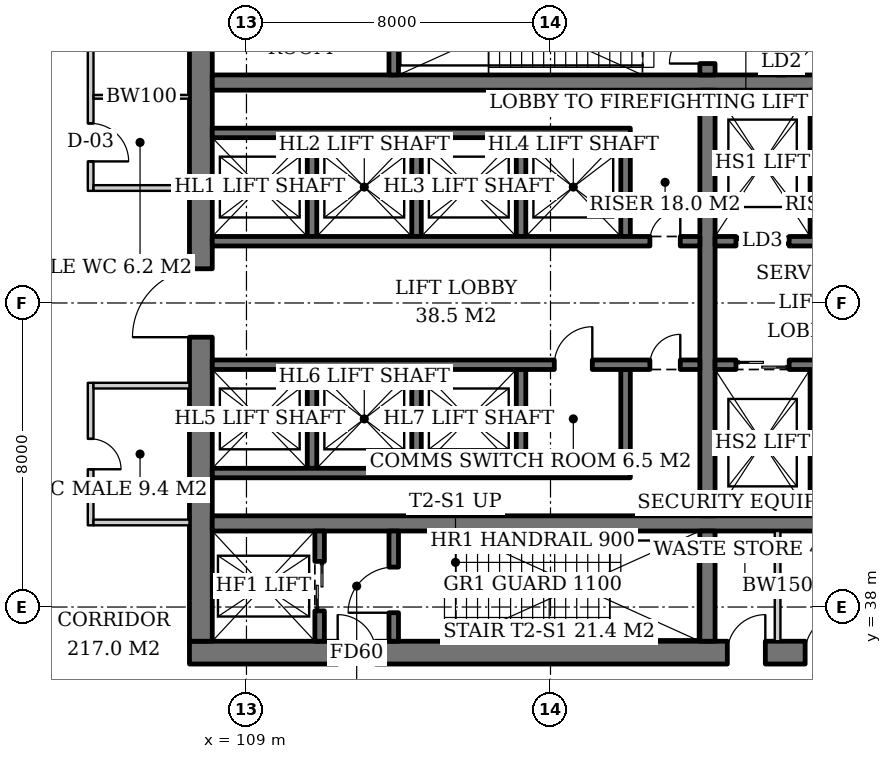
"""IFC4 building model, lengths in metres.
Left out: names, types, materials, properties, quantities, classifications, styles, units other than length and angle.
Written with IfcOpenShell. Run it as: python <this file> out.ifc"""

import sys

from ifc_helpers import new_model, si_unit, direction, frame, frame_2d, origin, place, context, subcontext, project, spatial, rectangle, extrude, element, fill, save


model = new_model("IFC4")
c1 = context("Model", 3, precision=1e-05, world=origin(), true_north=direction((0.0, 1.0)))
c2 = subcontext(c1, "Body", "Model", "MODEL_VIEW")
j1 = project(units=[si_unit("LENGTHUNIT", "METRE"), si_unit("PLANEANGLEUNIT", "RADIAN")], contexts=[c1])
p1 = place(None, origin())
s1 = spatial("IfcSite", under=j1, at=p1, CompositionType="ELEMENT")
p2 = place(p1, origin())
s2 = spatial("IfcBuilding", under=s1, at=p2, CompositionType="ELEMENT")
p3 = place(p2, frame((0.0, 0.0, 6.0)))
s3 = spatial("IfcBuildingStorey", under=s2, at=p3, CompositionType="ELEMENT", Elevation=6.0)
p4 = place(p3, frame((107.5, 36.8, 0.0), z_axis=(0.0, 0.0, 1.0), x_axis=(1.0, 0.0, 0.0)))
e1 = element("IfcWall", 1, at=p4, inside=s3, PredefinedType="SHEAR", context=c2, shape_type="SweptSolid", body=[
    extrude(rectangle(XDim=19.0, YDim=0.6, at=frame_2d((9.5, 0.0))), origin(), (0.0, 0.0, 1.0), 5.0),
])
p5 = place(p4, frame((3.9, 0.0, 0.0)))
e2 = element("IfcOpeningElement", 2, at=p5, cuts=e1, PredefinedType="OPENING", context=c2, shape_type="SweptSolid", body=[
    extrude(rectangle(XDim=1.0, YDim=2.1, at=frame_2d((0.5, 1.05))), frame((0.0, 0.31, 0.0), z_axis=(0.0, -1.0, 0.0), x_axis=(1.0, 0.0, 0.0)), (0.0, 0.0, 1.0), 0.62),
])
p6 = place(p4, frame((14.153, 0.0, 0.0)))
e3 = element("IfcOpeningElement", 3, at=p6, cuts=e1, PredefinedType="OPENING", context=c2, shape_type="SweptSolid", body=[
    extrude(rectangle(XDim=1.0, YDim=2.1, at=frame_2d((0.5, 1.05))), frame((0.0, 0.31, 0.0), z_axis=(0.0, -1.0, 0.0), x_axis=(1.0, 0.0, 0.0)), (0.0, 0.0, 1.0), 0.62),
])
p7 = place(p4, frame((16.2, 0.0, 0.0)))
e4 = element("IfcOpeningElement", 4, at=p7, cuts=e1, PredefinedType="OPENING", context=c2, shape_type="SweptSolid", body=[
    extrude(rectangle(XDim=1.0, YDim=2.1, at=frame_2d((0.5, 1.05))), frame((0.0, 0.31, 0.0), z_axis=(0.0, -1.0, 0.0), x_axis=(1.0, 0.0, 0.0)), (0.0, 0.0, 1.0), 0.62),
])
p8 = place(p3, frame((107.8, 37.1, 0.0), z_axis=(0.0, 0.0, 1.0), x_axis=(0.0, 1.0, 0.0)))
e5 = element("IfcWall", 5, at=p8, inside=s3, PredefinedType="SHEAR", context=c2, shape_type="SweptSolid", body=[
    extrude(rectangle(XDim=17.8, YDim=0.6, at=frame_2d((8.9, 0.0))), origin(), (0.0, 0.0, 1.0), 5.0),
])
p9 = place(p8, frame((8.0, 0.0, 0.0)))
e6 = element("IfcOpeningElement", 6, at=p9, cuts=e5, PredefinedType="OPENING", context=c2, shape_type="SweptSolid", body=[
    extrude(rectangle(XDim=1.8, YDim=2.4, at=frame_2d((0.9, 1.2))), frame((0.0, 0.31, 0.0), z_axis=(0.0, -1.0, 0.0), x_axis=(1.0, 0.0, 0.0)), (0.0, 0.0, 1.0), 0.62),
])
for number, where, z_axis, x_axis in (
    (7, (108.1, 40.2, 0.0), (0.0, 0.0, 1.0), (1.0, 0.0, 0.0)),
    (8, (108.1, 51.8, 0.0), (0.0, 0.0, 1.0), (1.0, 0.0, 0.0)),
):
    element("IfcWall", number, at=place(p3, frame(where, z_axis=z_axis, x_axis=x_axis)), inside=s3, PredefinedType="SHEAR", context=c2, shape_type="SweptSolid", body=[
        extrude(rectangle(XDim=17.8, YDim=0.4, at=frame_2d((8.9, 0.0))), origin(), (0.0, 0.0, 1.0), 5.0),
    ])
p10 = place(p3, frame((121.13, 37.1, 0.0), z_axis=(0.0, 0.0, 1.0), x_axis=(0.0, 1.0, 0.0)))
e9 = element("IfcWall", 9, at=p10, inside=s3, PredefinedType="SHEAR", context=c2, shape_type="SweptSolid", body=[
    extrude(rectangle(XDim=2.9, YDim=0.4, at=frame_2d((1.45, 0.0))), origin(), (0.0, 0.0, 1.0), 5.0),
])
p11 = place(p3, frame((121.13, 40.4, 0.0), z_axis=(0.0, 0.0, 1.0), x_axis=(0.0, 1.0, 0.0)))
e10 = element("IfcWall", 10, at=p11, inside=s3, PredefinedType="SHEAR", context=c2, shape_type="SweptSolid", body=[
    extrude(rectangle(XDim=11.2, YDim=0.4, at=frame_2d((5.6, 0.0))), origin(), (0.0, 0.0, 1.0), 5.0),
])
p12 = place(p3, frame((121.13, 52.0, 0.0), z_axis=(0.0, 0.0, 1.0), x_axis=(0.0, 1.0, 0.0)))
e11 = element("IfcWall", 11, at=p12, inside=s3, PredefinedType="SHEAR", context=c2, shape_type="SweptSolid", body=[
    extrude(rectangle(XDim=2.9, YDim=0.4, at=frame_2d((1.45, 0.0))), origin(), (0.0, 0.0, 1.0), 5.0),
])
p13 = place(p12, frame((0.3, 0.0, 0.0)))
e12 = element("IfcOpeningElement", 12, at=p13, cuts=e11, PredefinedType="OPENING", context=c2, shape_type="SweptSolid", body=[
    extrude(rectangle(XDim=1.0, YDim=2.1, at=frame_2d((0.5, 1.05))), frame((0.0, 0.21, 0.0), z_axis=(0.0, -1.0, 0.0), x_axis=(1.0, 0.0, 0.0)), (0.0, 0.0, 1.0), 0.42),
])
p14 = place(p3, frame((110.925, 37.1, 0.0), z_axis=(0.0, 0.0, 1.0), x_axis=(0.0, 1.0, 0.0)))
e13 = element("IfcWall", 13, at=p14, inside=s3, PredefinedType="SHEAR", context=c2, shape_type="SweptSolid", body=[
    extrude(rectangle(XDim=2.9, YDim=0.25, at=frame_2d((1.45, 0.0))), origin(), (0.0, 0.0, 1.0), 5.0),
])
p15 = place(p14, frame((0.8, 0.0, 0.0)))
e14 = element("IfcOpeningElement", 14, at=p15, cuts=e13, PredefinedType="OPENING", context=c2, shape_type="SweptSolid", body=[
    extrude(rectangle(XDim=1.3, YDim=2.2, at=frame_2d((0.65, 1.1))), frame((0.0, 0.135, 0.0), z_axis=(0.0, -1.0, 0.0), x_axis=(1.0, 0.0, 0.0)), (0.0, 0.0, 1.0), 0.27),
])
p16 = place(p3, frame((112.875, 37.1, 0.0), z_axis=(0.0, 0.0, 1.0), x_axis=(0.0, 1.0, 0.0)))
e15 = element("IfcWall", 15, at=p16, inside=s3, PredefinedType="SHEAR", context=c2, shape_type="SweptSolid", body=[
    extrude(rectangle(XDim=2.9, YDim=0.25, at=frame_2d((1.45, 0.0))), origin(), (0.0, 0.0, 1.0), 5.0),
])
p17 = place(p16, frame((0.75, 0.0, 0.0)))
e16 = element("IfcOpeningElement", 16, at=p17, cuts=e15, PredefinedType="OPENING", context=c2, shape_type="SweptSolid", body=[
    extrude(rectangle(XDim=1.2, YDim=2.1, at=frame_2d((0.6, 1.05))), frame((0.0, 0.135, 0.0), z_axis=(0.0, -1.0, 0.0), x_axis=(1.0, 0.0, 0.0)), (0.0, 0.0, 1.0), 0.27),
])
p18 = place(p3, frame((112.875, 52.0, 0.0), z_axis=(0.0, 0.0, 1.0), x_axis=(0.0, 1.0, 0.0)))
e17 = element("IfcWall", 17, at=p18, inside=s3, PredefinedType="SHEAR", context=c2, shape_type="SweptSolid", body=[
    extrude(rectangle(XDim=2.9, YDim=0.25, at=frame_2d((1.45, 0.0))), origin(), (0.0, 0.0, 1.0), 5.0),
])
p19 = place(p3, frame((123.075, 52.0, 0.0), z_axis=(0.0, 0.0, 1.0), x_axis=(0.0, 1.0, 0.0)))
e18 = element("IfcWall", 18, at=p19, inside=s3, PredefinedType="SHEAR", context=c2, shape_type="SweptSolid", body=[
    extrude(rectangle(XDim=2.9, YDim=0.25, at=frame_2d((1.45, 0.0))), origin(), (0.0, 0.0, 1.0), 5.0),
])
p20 = place(p19, frame((0.8, 0.0, 0.0)))
e19 = element("IfcOpeningElement", 19, at=p20, cuts=e18, PredefinedType="OPENING", context=c2, shape_type="SweptSolid", body=[
    extrude(rectangle(XDim=1.3, YDim=2.2, at=frame_2d((0.65, 1.1))), frame((0.0, 0.135, 0.0), z_axis=(0.0, -1.0, 0.0), x_axis=(1.0, 0.0, 0.0)), (0.0, 0.0, 1.0), 0.27),
])
for number, where, z_axis, x_axis in (
    (20, (110.725, 47.75, 0.0), (0.0, 0.0, 1.0), (0.0, 1.0, 0.0)),
    (21, (113.475, 47.75, 0.0), (0.0, 0.0, 1.0), (0.0, 1.0, 0.0)),
    (22, (116.225, 47.75, 0.0), (0.0, 0.0, 1.0), (0.0, 1.0, 0.0)),
    (23, (118.975, 47.75, 0.0), (0.0, 0.0, 1.0), (0.0, 1.0, 0.0)),
):
    element("IfcWall", number, at=place(p3, frame(where, z_axis=z_axis, x_axis=x_axis)), inside=s3, PredefinedType="SHEAR", context=c2, shape_type="SweptSolid", body=[
        extrude(rectangle(XDim=2.6, YDim=0.25, at=frame_2d((1.3, 0.0))), origin(), (0.0, 0.0, 1.0), 5.0),
    ])
p21 = place(p3, frame((108.1, 50.475, 0.0), z_axis=(0.0, 0.0, 1.0), x_axis=(1.0, 0.0, 0.0)))
e24 = element("IfcWall", 24, at=p21, inside=s3, PredefinedType="SHEAR", context=c2, shape_type="SweptSolid", body=[
    extrude(rectangle(XDim=11.0, YDim=0.25, at=frame_2d((5.5, 0.0))), origin(), (0.0, 0.0, 1.0), 5.0),
])
p22 = place(p3, frame((108.1, 47.625, 0.0), z_axis=(0.0, 0.0, 1.0), x_axis=(1.0, 0.0, 0.0)))
e25 = element("IfcWall", 25, at=p22, inside=s3, PredefinedType="SHEAR", context=c2, shape_type="SweptSolid", body=[
    extrude(rectangle(XDim=12.83, YDim=0.25, at=frame_2d((6.415, 0.0))), origin(), (0.0, 0.0, 1.0), 5.0),
])
p23 = place(p22, frame((11.515, 0.0, 0.0)))
e26 = element("IfcOpeningElement", 26, at=p23, cuts=e25, PredefinedType="OPENING", context=c2, shape_type="SweptSolid", body=[
    extrude(rectangle(XDim=0.8, YDim=2.0, at=frame_2d((0.4, 1.0))), frame((0.0, 0.135, 0.0), z_axis=(0.0, -1.0, 0.0), x_axis=(1.0, 0.0, 0.0)), (0.0, 0.0, 1.0), 0.27),
])
for number, where, z_axis, x_axis in (
    (27, (110.725, 44.25, 0.0), (0.0, 0.0, 1.0), (0.0, -1.0, 0.0)),
    (28, (113.475, 44.25, 0.0), (0.0, 0.0, 1.0), (0.0, -1.0, 0.0)),
    (29, (116.225, 44.25, 0.0), (0.0, 0.0, 1.0), (0.0, -1.0, 0.0)),
    (30, (118.975, 44.25, 0.0), (0.0, 0.0, 1.0), (0.0, -1.0, 0.0)),
):
    element("IfcWall", number, at=place(p3, frame(where, z_axis=z_axis, x_axis=x_axis)), inside=s3, PredefinedType="SHEAR", context=c2, shape_type="SweptSolid", body=[
        extrude(rectangle(XDim=2.6, YDim=0.25, at=frame_2d((1.3, 0.0))), origin(), (0.0, 0.0, 1.0), 5.0),
    ])
p24 = place(p3, frame((108.1, 41.525, 0.0), z_axis=(0.0, 0.0, 1.0), x_axis=(1.0, 0.0, 0.0)))
e31 = element("IfcWall", 31, at=p24, inside=s3, PredefinedType="SHEAR", context=c2, shape_type="SweptSolid", body=[
    extrude(rectangle(XDim=11.0, YDim=0.25, at=frame_2d((5.5, 0.0))), origin(), (0.0, 0.0, 1.0), 5.0),
])
p25 = place(p3, frame((108.1, 44.375, 0.0), z_axis=(0.0, 0.0, 1.0), x_axis=(1.0, 0.0, 0.0)))
e32 = element("IfcWall", 32, at=p25, inside=s3, PredefinedType="SHEAR", context=c2, shape_type="SweptSolid", body=[
    extrude(rectangle(XDim=12.83, YDim=0.25, at=frame_2d((6.415, 0.0))), origin(), (0.0, 0.0, 1.0), 5.0),
])
p26 = place(p25, frame((9.0, 0.0, 0.0)))
e33 = element("IfcOpeningElement", 33, at=p26, cuts=e32, PredefinedType="OPENING", context=c2, shape_type="SweptSolid", body=[
    extrude(rectangle(XDim=1.0, YDim=2.1, at=frame_2d((0.5, 1.05))), frame((0.0, 0.135, 0.0), z_axis=(0.0, -1.0, 0.0), x_axis=(1.0, 0.0, 0.0)), (0.0, 0.0, 1.0), 0.27),
])
p27 = place(p25, frame((11.515, 0.0, 0.0)))
e34 = element("IfcOpeningElement", 34, at=p27, cuts=e32, PredefinedType="OPENING", context=c2, shape_type="SweptSolid", body=[
    extrude(rectangle(XDim=0.8, YDim=2.0, at=frame_2d((0.4, 1.0))), frame((0.0, 0.135, 0.0), z_axis=(0.0, -1.0, 0.0), x_axis=(1.0, 0.0, 0.0)), (0.0, 0.0, 1.0), 0.27),
])
p28 = place(p3, frame((123.955, 47.75, 0.0), z_axis=(0.0, 0.0, 1.0), x_axis=(0.0, 1.0, 0.0)))
e35 = element("IfcWall", 35, at=p28, inside=s3, PredefinedType="SHEAR", context=c2, shape_type="SweptSolid", body=[
    extrude(rectangle(XDim=3.85, YDim=0.25, at=frame_2d((1.925, 0.0))), origin(), (0.0, 0.0, 1.0), 5.0),
])
p29 = place(p3, frame((121.33, 47.625, 0.0), z_axis=(0.0, 0.0, 1.0), x_axis=(1.0, 0.0, 0.0)))
e36 = element("IfcWall", 36, at=p29, inside=s3, PredefinedType="SHEAR", context=c2, shape_type="SweptSolid", body=[
    extrude(rectangle(XDim=4.57, YDim=0.25, at=frame_2d((2.285, 0.0))), origin(), (0.0, 0.0, 1.0), 5.0),
])
p30 = place(p29, frame((0.55, 0.0, 0.0)))
e37 = element("IfcOpeningElement", 37, at=p30, cuts=e36, PredefinedType="OPENING", context=c2, shape_type="SweptSolid", body=[
    extrude(rectangle(XDim=1.4, YDim=2.4, at=frame_2d((0.7, 1.2))), frame((0.0, 0.135, 0.0), z_axis=(0.0, -1.0, 0.0), x_axis=(1.0, 0.0, 0.0)), (0.0, 0.0, 1.0), 0.27),
])
p31 = place(p29, frame((3.26, 0.0, 0.0)))
e38 = element("IfcOpeningElement", 38, at=p31, cuts=e36, PredefinedType="OPENING", context=c2, shape_type="SweptSolid", body=[
    extrude(rectangle(XDim=0.8, YDim=2.0, at=frame_2d((0.4, 1.0))), frame((0.0, 0.135, 0.0), z_axis=(0.0, -1.0, 0.0), x_axis=(1.0, 0.0, 0.0)), (0.0, 0.0, 1.0), 0.27),
])
p32 = place(p3, frame((123.955, 44.25, 0.0), z_axis=(0.0, 0.0, 1.0), x_axis=(0.0, -1.0, 0.0)))
e39 = element("IfcWall", 39, at=p32, inside=s3, PredefinedType="SHEAR", context=c2, shape_type="SweptSolid", body=[
    extrude(rectangle(XDim=3.85, YDim=0.25, at=frame_2d((1.925, 0.0))), origin(), (0.0, 0.0, 1.0), 5.0),
])
p33 = place(p3, frame((121.33, 44.375, 0.0), z_axis=(0.0, 0.0, 1.0), x_axis=(1.0, 0.0, 0.0)))
e40 = element("IfcWall", 40, at=p33, inside=s3, PredefinedType="SHEAR", context=c2, shape_type="SweptSolid", body=[
    extrude(rectangle(XDim=4.57, YDim=0.25, at=frame_2d((2.285, 0.0))), origin(), (0.0, 0.0, 1.0), 5.0),
])
p34 = place(p33, frame((0.55, 0.0, 0.0)))
e41 = element("IfcOpeningElement", 41, at=p34, cuts=e40, PredefinedType="OPENING", context=c2, shape_type="SweptSolid", body=[
    extrude(rectangle(XDim=1.4, YDim=2.4, at=frame_2d((0.7, 1.2))), frame((0.0, 0.135, 0.0), z_axis=(0.0, -1.0, 0.0), x_axis=(1.0, 0.0, 0.0)), (0.0, 0.0, 1.0), 0.27),
])
p35 = place(p33, frame((3.26, 0.0, 0.0)))
e42 = element("IfcOpeningElement", 42, at=p35, cuts=e40, PredefinedType="OPENING", context=c2, shape_type="SweptSolid", body=[
    extrude(rectangle(XDim=0.8, YDim=2.0, at=frame_2d((0.4, 1.0))), frame((0.0, 0.135, 0.0), z_axis=(0.0, -1.0, 0.0), x_axis=(1.0, 0.0, 0.0)), (0.0, 0.0, 1.0), 0.27),
])
p36 = place(p3, frame((122.975, 37.1, 0.0), z_axis=(0.0, 0.0, 1.0), x_axis=(0.0, 1.0, 0.0)))
e43 = element("IfcWall", 43, at=p36, inside=s3, PredefinedType="SOLIDWALL", context=c2, shape_type="SweptSolid", body=[
    extrude(rectangle(XDim=2.9, YDim=0.15, at=frame_2d((1.45, 0.0))), origin(), (0.0, 0.0, 1.0), 4.7),
])
p37 = place(p3, frame((104.9, 55.1, 0.0), z_axis=(0.0, 0.0, 1.0), x_axis=(0.0, -1.0, 0.0)))
e44 = element("IfcWall", 44, at=p37, inside=s3, PredefinedType="PARTITIONING", context=c2, shape_type="SweptSolid", body=[
    extrude(rectangle(XDim=6.15, YDim=0.15, at=frame_2d((3.075, 0.0))), origin(), (0.0, 0.0, 1.0), 3.9),
])
p38 = place(p37, frame((1.475, 0.0, 0.0)))
e45 = element("IfcOpeningElement", 45, at=p38, cuts=e44, PredefinedType="OPENING", context=c2, shape_type="SweptSolid", body=[
    extrude(rectangle(XDim=0.8, YDim=2.1, at=frame_2d((0.4, 1.05))), frame((0.0, 0.085, 0.0), z_axis=(0.0, -1.0, 0.0), x_axis=(1.0, 0.0, 0.0)), (0.0, 0.0, 1.0), 0.17),
])
p39 = place(p37, frame((4.375, 0.0, 0.0)))
e46 = element("IfcOpeningElement", 46, at=p39, cuts=e44, PredefinedType="OPENING", context=c2, shape_type="SweptSolid", body=[
    extrude(rectangle(XDim=1.0, YDim=2.1, at=frame_2d((0.5, 1.05))), frame((0.0, 0.085, 0.0), z_axis=(0.0, -1.0, 0.0), x_axis=(1.0, 0.0, 0.0)), (0.0, 0.0, 1.0), 0.17),
])
p40 = place(p3, frame((104.975, 51.425, 0.0), z_axis=(0.0, 0.0, 1.0), x_axis=(1.0, 0.0, 0.0)))
e47 = element("IfcWall", 47, at=p40, inside=s3, PredefinedType="SOLIDWALL", context=c2, shape_type="SweptSolid", body=[
    extrude(rectangle(XDim=2.525, YDim=0.1, at=frame_2d((1.262, 0.0))), origin(), (0.0, 0.0, 1.0), 4.7),
])
p41 = place(p3, frame((104.975, 49.025, 0.0), z_axis=(0.0, 0.0, 1.0), x_axis=(1.0, 0.0, 0.0)))
e48 = element("IfcWall", 48, at=p41, inside=s3, PredefinedType="PARTITIONING", context=c2, shape_type="SweptSolid", body=[
    extrude(rectangle(XDim=2.525, YDim=0.15, at=frame_2d((1.262, 0.0))), origin(), (0.0, 0.0, 1.0), 4.7),
])
p42 = place(p3, frame((104.9, 43.9, 0.0), z_axis=(0.0, 0.0, 1.0), x_axis=(0.0, -1.0, 0.0)))
e49 = element("IfcWall", 49, at=p42, inside=s3, PredefinedType="PARTITIONING", context=c2, shape_type="SweptSolid", body=[
    extrude(rectangle(XDim=3.75, YDim=0.15, at=frame_2d((1.875, 0.0))), origin(), (0.0, 0.0, 1.0), 3.947),
])
p43 = place(p42, frame((1.475, 0.0, 0.0)))
e50 = element("IfcOpeningElement", 50, at=p43, cuts=e49, PredefinedType="OPENING", context=c2, shape_type="SweptSolid", body=[
    extrude(rectangle(XDim=0.8, YDim=2.1, at=frame_2d((0.4, 1.05))), frame((0.0, 0.085, 0.0), z_axis=(0.0, -1.0, 0.0), x_axis=(1.0, 0.0, 0.0)), (0.0, 0.0, 1.0), 0.17),
])
for number, where, z_axis, x_axis in (
    (51, (104.975, 43.825, 0.0), (0.0, 0.0, 1.0), (1.0, 0.0, 0.0)),
    (52, (104.975, 40.225, 0.0), (0.0, 0.0, 1.0), (1.0, 0.0, 0.0)),
):
    element("IfcWall", number, at=place(p3, frame(where, z_axis=z_axis, x_axis=x_axis)), inside=s3, PredefinedType="PARTITIONING", context=c2, shape_type="SweptSolid", body=[
        extrude(rectangle(XDim=2.525, YDim=0.15, at=frame_2d((1.262, 0.0))), origin(), (0.0, 0.0, 1.0), 4.7),
    ])
p44 = place(p15, origin())
e53 = element("IfcDoor", 53, at=p44, inside=s3, OperationType="DOUBLE_DOOR_SLIDING", PredefinedType="DOOR", context=c2, shape_type="SweptSolid", body=[
    extrude(rectangle(XDim=1.3, YDim=2.2, at=frame_2d((0.65, 1.1))), frame((0.0, 0.025, 0.0), z_axis=(0.0, -1.0, 0.0), x_axis=(1.0, 0.0, 0.0)), (0.0, 0.0, 1.0), 0.05),
])
fill(e14, e53)
p45 = place(p17, origin())
e54 = element("IfcDoor", 54, at=p45, inside=s3, OperationType="SINGLE_SWING_LEFT", PredefinedType="DOOR", context=c2, shape_type="SweptSolid", body=[
    extrude(rectangle(XDim=1.2, YDim=2.1, at=frame_2d((0.6, 1.05))), frame((0.0, 0.025, 0.0), z_axis=(0.0, -1.0, 0.0), x_axis=(1.0, 0.0, 0.0)), (0.0, 0.0, 1.0), 0.05),
])
fill(e16, e54)
p46 = place(p23, origin())
e55 = element("IfcDoor", 55, at=p46, inside=s3, OperationType="SINGLE_SWING_RIGHT", PredefinedType="DOOR", context=c2, shape_type="SweptSolid", body=[
    extrude(rectangle(XDim=0.8, YDim=2.0, at=frame_2d((0.4, 1.0))), frame((0.0, 0.025, 0.0), z_axis=(0.0, -1.0, 0.0), x_axis=(1.0, 0.0, 0.0)), (0.0, 0.0, 1.0), 0.05),
])
fill(e26, e55)
p47 = place(p26, origin())
e56 = element("IfcDoor", 56, at=p47, inside=s3, OperationType="SINGLE_SWING_RIGHT", PredefinedType="DOOR", context=c2, shape_type="SweptSolid", body=[
    extrude(rectangle(XDim=1.0, YDim=2.1, at=frame_2d((0.5, 1.05))), frame((0.0, 0.025, 0.0), z_axis=(0.0, -1.0, 0.0), x_axis=(1.0, 0.0, 0.0)), (0.0, 0.0, 1.0), 0.05),
])
fill(e33, e56)
p48 = place(p27, origin())
e57 = element("IfcDoor", 57, at=p48, inside=s3, OperationType="SINGLE_SWING_RIGHT", PredefinedType="DOOR", context=c2, shape_type="SweptSolid", body=[
    extrude(rectangle(XDim=0.8, YDim=2.0, at=frame_2d((0.4, 1.0))), frame((0.0, 0.025, 0.0), z_axis=(0.0, -1.0, 0.0), x_axis=(1.0, 0.0, 0.0)), (0.0, 0.0, 1.0), 0.05),
])
fill(e34, e57)
p49 = place(p30, origin())
e58 = element("IfcDoor", 58, at=p49, inside=s3, OperationType="DOUBLE_DOOR_SLIDING", PredefinedType="DOOR", context=c2, shape_type="SweptSolid", body=[
    extrude(rectangle(XDim=1.4, YDim=2.4, at=frame_2d((0.7, 1.2))), frame((0.0, 0.025, 0.0), z_axis=(0.0, -1.0, 0.0), x_axis=(1.0, 0.0, 0.0)), (0.0, 0.0, 1.0), 0.05),
])
fill(e37, e58)
p50 = place(p34, origin())
e59 = element("IfcDoor", 59, at=p50, inside=s3, OperationType="DOUBLE_DOOR_SLIDING", PredefinedType="DOOR", context=c2, shape_type="SweptSolid", body=[
    extrude(rectangle(XDim=1.4, YDim=2.4, at=frame_2d((0.7, 1.2))), frame((0.0, 0.025, 0.0), z_axis=(0.0, -1.0, 0.0), x_axis=(1.0, 0.0, 0.0)), (0.0, 0.0, 1.0), 0.05),
])
fill(e41, e59)
p51 = place(p13, origin())
e60 = element("IfcDoor", 60, at=p51, inside=s3, OperationType="SINGLE_SWING_LEFT", PredefinedType="DOOR", context=c2, shape_type="SweptSolid", body=[
    extrude(rectangle(XDim=1.0, YDim=2.1, at=frame_2d((0.5, 1.05))), frame((0.0, 0.025, 0.0), z_axis=(0.0, -1.0, 0.0), x_axis=(1.0, 0.0, 0.0)), (0.0, 0.0, 1.0), 0.05),
])
fill(e12, e60)
p52 = place(p5, origin())
e61 = element("IfcDoor", 61, at=p52, inside=s3, OperationType="SINGLE_SWING_LEFT", PredefinedType="DOOR", context=c2, shape_type="SweptSolid", body=[
    extrude(rectangle(XDim=1.0, YDim=2.1, at=frame_2d((0.5, 1.05))), frame((0.0, 0.025, 0.0), z_axis=(0.0, -1.0, 0.0), x_axis=(1.0, 0.0, 0.0)), (0.0, 0.0, 1.0), 0.05),
])
fill(e2, e61)
p53 = place(p9, origin())
e62 = element("IfcDoor", 62, at=p53, inside=s3, OperationType="DOUBLE_DOOR_SINGLE_SWING", PredefinedType="DOOR", context=c2, shape_type="SweptSolid", body=[
    extrude(rectangle(XDim=1.8, YDim=2.4, at=frame_2d((0.9, 1.2))), frame((0.0, 0.025, 0.0), z_axis=(0.0, -1.0, 0.0), x_axis=(1.0, 0.0, 0.0)), (0.0, 0.0, 1.0), 0.05),
])
fill(e6, e62)
p54 = place(p6, origin())
e63 = element("IfcDoor", 63, at=p54, inside=s3, OperationType="SINGLE_SWING_RIGHT", PredefinedType="DOOR", context=c2, shape_type="SweptSolid", body=[
    extrude(rectangle(XDim=1.0, YDim=2.1, at=frame_2d((0.5, 1.05))), frame((0.0, 0.29, 0.0), z_axis=(0.0, -1.0, 0.0), x_axis=(1.0, 0.0, 0.0)), (0.0, 0.0, 1.0), 0.05),
])
fill(e3, e63)
p55 = place(p7, origin())
e64 = element("IfcDoor", 64, at=p55, inside=s3, OperationType="SINGLE_SWING_RIGHT", PredefinedType="DOOR", context=c2, shape_type="SweptSolid", body=[
    extrude(rectangle(XDim=1.0, YDim=2.1, at=frame_2d((0.5, 1.05))), frame((0.0, 0.29, 0.0), z_axis=(0.0, -1.0, 0.0), x_axis=(1.0, 0.0, 0.0)), (0.0, 0.0, 1.0), 0.05),
])
fill(e4, e64)
p56 = place(p39, origin())
e65 = element("IfcDoor", 65, at=p56, inside=s3, OperationType="SINGLE_SWING_RIGHT", PredefinedType="DOOR", context=c2, shape_type="SweptSolid", body=[
    extrude(rectangle(XDim=1.0, YDim=2.1, at=frame_2d((0.5, 1.05))), frame((0.0, 0.025, 0.0), z_axis=(0.0, -1.0, 0.0), x_axis=(1.0, 0.0, 0.0)), (0.0, 0.0, 1.0), 0.05),
])
fill(e46, e65)
p57 = place(p43, origin())
e66 = element("IfcDoor", 66, at=p57, inside=s3, OperationType="SINGLE_SWING_RIGHT", PredefinedType="DOOR", context=c2, shape_type="SweptSolid", body=[
    extrude(rectangle(XDim=0.8, YDim=2.1, at=frame_2d((0.4, 1.05))), frame((0.0, 0.025, 0.0), z_axis=(0.0, -1.0, 0.0), x_axis=(1.0, 0.0, 0.0)), (0.0, 0.0, 1.0), 0.05),
])
fill(e50, e66)
save(model, sys.argv[1])
